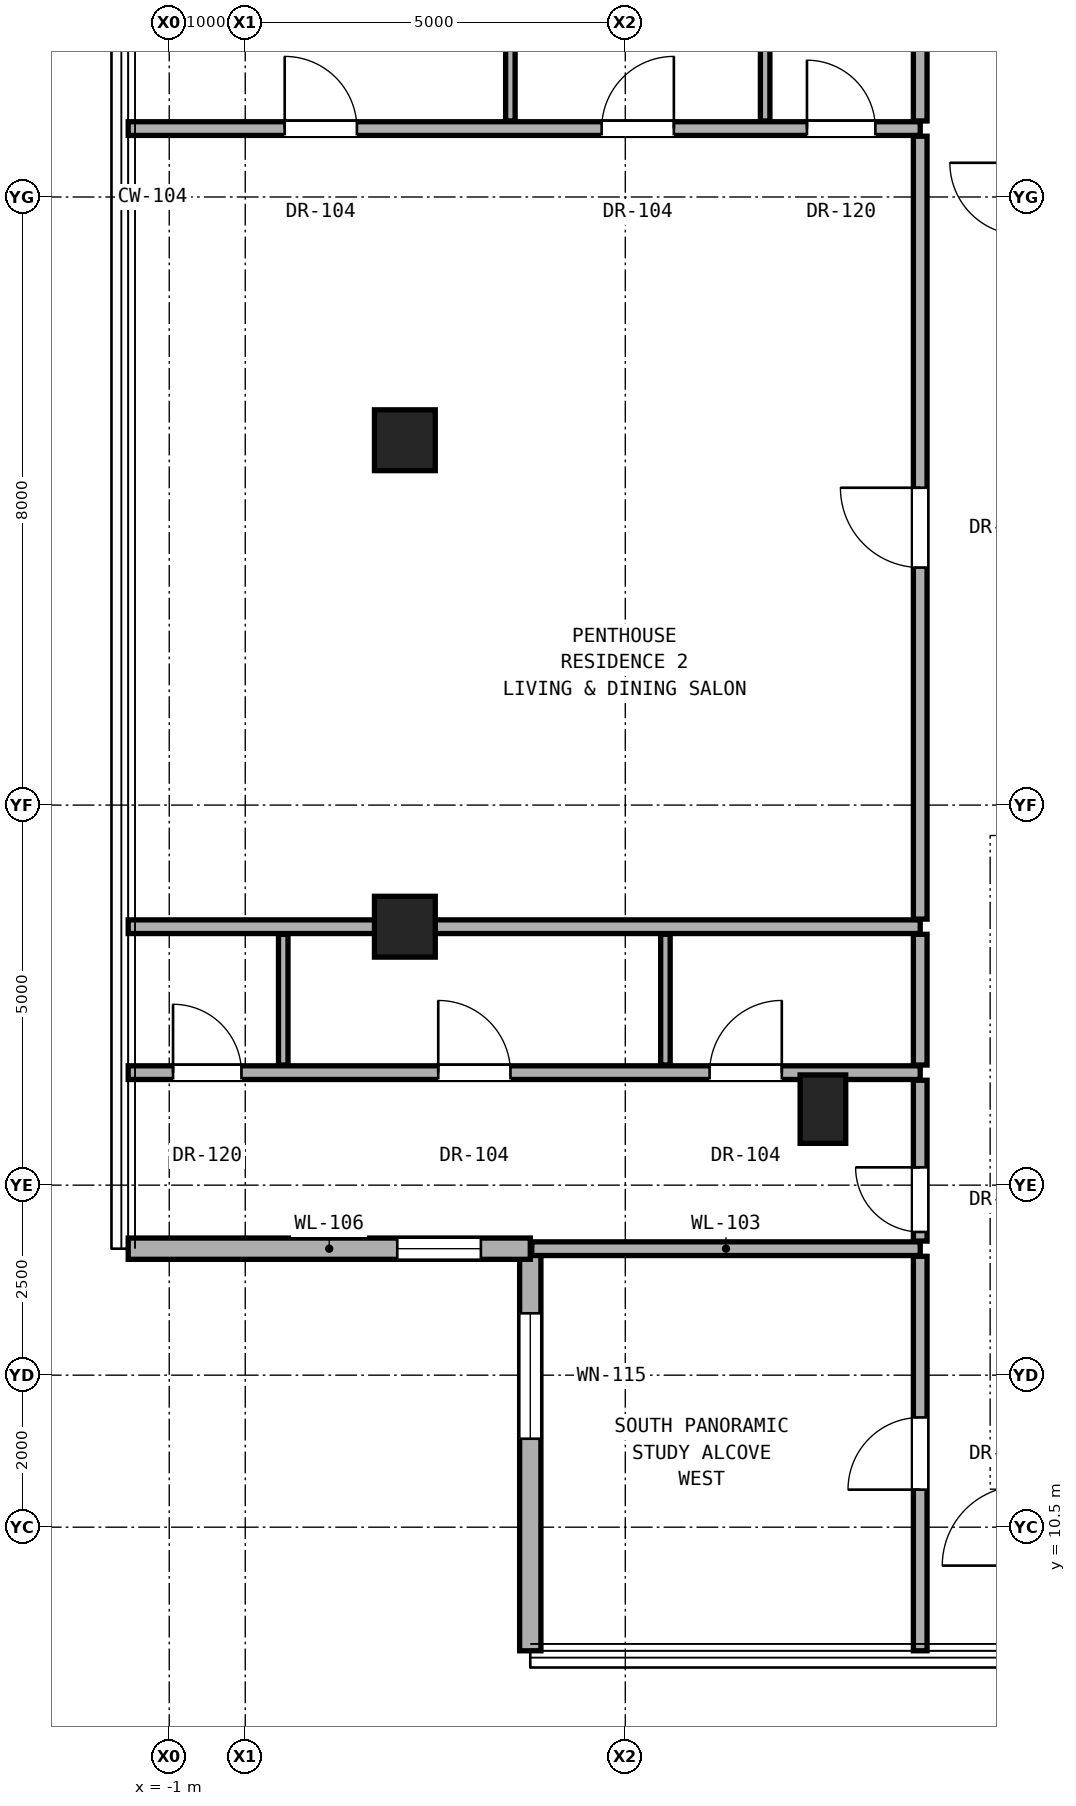
"""IFC4 building model, lengths in metres.
Left out: names, types, materials, properties, quantities, classifications, styles, units other than length and angle.
Written with IfcOpenShell. Run it as: python <this file> out.ifc"""

import sys

from ifc_helpers import new_model, si_unit, direction, frame, frame_2d, origin, origin_2d, place, context, subcontext, project, spatial, rectangle, hollow_rectangle, extrude, element, fill, save


model = new_model("IFC4")
c1 = context("Model", 3, precision=1e-05, world=origin(), true_north=direction((0.0, 1.0)))
c2 = subcontext(c1, "Body", "Model", "MODEL_VIEW")
j1 = project(units=[si_unit("LENGTHUNIT", "METRE"), si_unit("PLANEANGLEUNIT", "RADIAN")], contexts=[c1])
p1 = place(None, origin())
s1 = spatial("IfcSite", under=j1, at=p1, CompositionType="ELEMENT")
p2 = place(p1, origin())
s2 = spatial("IfcBuilding", under=s1, at=p2, CompositionType="ELEMENT")
p3 = place(p2, frame((0.0, 0.0, 242.5)))
s3 = spatial("IfcBuildingStorey", under=s2, at=p3, CompositionType="ELEMENT", Elevation=242.5)
for number, where, z_axis, x_axis in (
    (1, (2.1, 18.4, 0.0), (0.0, 0.0, 1.0), (1.0, 0.0, 0.0)),
    (2, (2.1, 24.8, 0.0), (0.0, 0.0, 1.0), (1.0, 0.0, 0.0)),
):
    element("IfcColumn", number, at=place(p3, frame(where, z_axis=z_axis, x_axis=x_axis)), inside=s3, PredefinedType="COLUMN", context=c2, shape_type="SweptSolid", body=[
        extrude(hollow_rectangle(XDim=0.8, YDim=0.8, WallThickness=0.045, at=origin_2d()), origin(), (0.0, 0.0, 1.0), 3.3),
    ])
p4 = place(p3, frame((7.6, 16.0, 0.0), z_axis=(0.0, 0.0, 1.0), x_axis=(1.0, 0.0, 0.0)))
e3 = element("IfcColumn", 3, at=p4, inside=s3, PredefinedType="PILASTER", context=c2, shape_type="SweptSolid", body=[
    extrude(rectangle(XDim=0.6, YDim=0.9, at=origin_2d()), origin(), (0.0, 0.0, 1.0), 3.3),
])
p5 = place(p3, frame((3.75, 14.164, 0.0), z_axis=(0.0, 0.0, 1.0), x_axis=(0.0, -1.0, 0.0)))
e4 = element("IfcWall", 4, at=p5, inside=s3, PredefinedType="SOLIDWALL", context=c2, shape_type="SweptSolid", body=[
    extrude(rectangle(XDim=5.29, YDim=0.28, at=frame_2d((2.645, 0.0))), origin(), (0.0, 0.0, 1.0), 3.08),
])
p6 = place(p5, frame((0.85, 0.0, 0.73)))
e5 = element("IfcOpeningElement", 5, at=p6, cuts=e4, PredefinedType="OPENING", context=c2, shape_type="SweptSolid", body=[
    extrude(rectangle(XDim=1.65, YDim=2.2, at=frame_2d((0.825, 1.1))), frame((0.0, 0.15, 0.0), z_axis=(0.0, -1.0, 0.0), x_axis=(1.0, 0.0, 0.0)), (0.0, 0.0, 1.0), 0.3),
])
p7 = place(p3, frame((-1.54, 14.164, 0.0), z_axis=(0.0, 0.0, 1.0), x_axis=(1.0, 0.0, 0.0)))
e6 = element("IfcWall", 6, at=p7, inside=s3, PredefinedType="SOLIDWALL", context=c2, shape_type="SweptSolid", body=[
    extrude(rectangle(XDim=5.29, YDim=0.28, at=frame_2d((2.645, 0.0))), origin(), (0.0, 0.0, 1.0), 3.08),
])
p8 = place(p7, frame((3.54, 0.0, 0.85)))
e7 = element("IfcOpeningElement", 7, at=p8, cuts=e6, PredefinedType="OPENING", context=c2, shape_type="SweptSolid", body=[
    extrude(rectangle(XDim=1.1, YDim=2.0, at=frame_2d((0.55, 1.0))), frame((0.0, 0.15, 0.0), z_axis=(0.0, -1.0, 0.0), x_axis=(1.0, 0.0, 0.0)), (0.0, 0.0, 1.0), 0.3),
])
p9 = place(p3, frame((3.77, 14.164, 0.0), z_axis=(0.0, 0.0, 1.0), x_axis=(1.0, 0.0, 0.0)))
e8 = element("IfcWall", 8, at=p9, inside=s3, PredefinedType="PARTITIONING", context=c2, shape_type="SweptSolid", body=[
    extrude(rectangle(XDim=5.11, YDim=0.18, at=frame_2d((2.555, 0.0))), origin(), (0.0, 0.0, 1.0), 3.1),
])
p10 = place(p3, frame((-1.54, 16.48, 0.0), z_axis=(0.0, 0.0, 1.0), x_axis=(1.0, 0.0, 0.0)))
e9 = element("IfcWall", 9, at=p10, inside=s3, PredefinedType="PARTITIONING", context=c2, shape_type="SweptSolid", body=[
    extrude(rectangle(XDim=10.42, YDim=0.18, at=frame_2d((5.21, 0.0))), origin(), (0.0, 0.0, 1.0), 2.543),
])
p11 = place(p10, frame((4.079, 0.0, 0.0)))
e10 = element("IfcOpeningElement", 10, at=p11, cuts=e9, PredefinedType="OPENING", context=c2, shape_type="SweptSolid", body=[
    extrude(rectangle(XDim=0.95, YDim=2.15, at=frame_2d((0.475, 1.075))), frame((0.0, 0.1, 0.0), z_axis=(0.0, -1.0, 0.0), x_axis=(1.0, 0.0, 0.0)), (0.0, 0.0, 1.0), 0.2),
])
p12 = place(p10, frame((7.649, 0.0, 0.0)))
e11 = element("IfcOpeningElement", 11, at=p12, cuts=e9, PredefinedType="OPENING", context=c2, shape_type="SweptSolid", body=[
    extrude(rectangle(XDim=0.95, YDim=2.15, at=frame_2d((0.475, 1.075))), frame((0.0, 0.1, 0.0), z_axis=(0.0, -1.0, 0.0), x_axis=(1.0, 0.0, 0.0)), (0.0, 0.0, 1.0), 0.2),
])
p13 = place(p10, frame((0.59, 0.0, 0.0)))
e12 = element("IfcOpeningElement", 12, at=p13, cuts=e9, PredefinedType="OPENING", context=c2, shape_type="SweptSolid", body=[
    extrude(rectangle(XDim=0.9, YDim=2.1, at=frame_2d((0.45, 1.05))), frame((0.0, 0.1, 0.0), z_axis=(0.0, -1.0, 0.0), x_axis=(1.0, 0.0, 0.0)), (0.0, 0.0, 1.0), 0.2),
])
p14 = place(p3, frame((-1.54, 18.4, 0.0), z_axis=(0.0, 0.0, 1.0), x_axis=(1.0, 0.0, 0.0)))
e13 = element("IfcWall", 13, at=p14, inside=s3, PredefinedType="PARTITIONING", context=c2, shape_type="SweptSolid", body=[
    extrude(rectangle(XDim=10.42, YDim=0.18, at=frame_2d((5.21, 0.0))), origin(), (0.0, 0.0, 1.0), 2.319),
])
p15 = place(p3, frame((-1.54, 28.9, 0.0), z_axis=(0.0, 0.0, 1.0), x_axis=(1.0, 0.0, 0.0)))
e14 = element("IfcWall", 14, at=p15, inside=s3, PredefinedType="PARTITIONING", context=c2, shape_type="SweptSolid", body=[
    extrude(rectangle(XDim=10.42, YDim=0.18, at=frame_2d((5.21, 0.0))), origin(), (0.0, 0.0, 1.0), 2.319),
])
p16 = place(p15, frame((2.059, 0.0, 0.0)))
e15 = element("IfcOpeningElement", 15, at=p16, cuts=e14, PredefinedType="OPENING", context=c2, shape_type="SweptSolid", body=[
    extrude(rectangle(XDim=0.95, YDim=2.15, at=frame_2d((0.475, 1.075))), frame((0.0, 0.1, 0.0), z_axis=(0.0, -1.0, 0.0), x_axis=(1.0, 0.0, 0.0)), (0.0, 0.0, 1.0), 0.2),
])
p17 = place(p15, frame((6.229, 0.0, 0.0)))
e16 = element("IfcOpeningElement", 16, at=p17, cuts=e14, PredefinedType="OPENING", context=c2, shape_type="SweptSolid", body=[
    extrude(rectangle(XDim=0.95, YDim=2.15, at=frame_2d((0.475, 1.075))), frame((0.0, 0.1, 0.0), z_axis=(0.0, -1.0, 0.0), x_axis=(1.0, 0.0, 0.0)), (0.0, 0.0, 1.0), 0.2),
])
p18 = place(p15, frame((8.93, 0.0, 0.0)))
e17 = element("IfcOpeningElement", 17, at=p18, cuts=e14, PredefinedType="OPENING", context=c2, shape_type="SweptSolid", body=[
    extrude(rectangle(XDim=0.9, YDim=2.1, at=frame_2d((0.45, 1.05))), frame((0.0, 0.1, 0.0), z_axis=(0.0, -1.0, 0.0), x_axis=(1.0, 0.0, 0.0)), (0.0, 0.0, 1.0), 0.2),
])
p19 = place(p3, frame((0.5, 16.58, 0.0), z_axis=(0.0, 0.0, 1.0), x_axis=(0.0, 1.0, 0.0)))
e18 = element("IfcWall", 18, at=p19, inside=s3, PredefinedType="PARTITIONING", context=c2, shape_type="SweptSolid", body=[
    extrude(rectangle(XDim=1.72, YDim=0.125, at=frame_2d((0.86, 0.0))), origin(), (0.0, 0.0, 1.0), 3.1),
])
p20 = place(p3, frame((3.488, 29.0, 0.0), z_axis=(0.0, 0.0, 1.0), x_axis=(0.0, 1.0, 0.0)))
e19 = element("IfcWall", 19, at=p20, inside=s3, PredefinedType="PARTITIONING", context=c2, shape_type="SweptSolid", body=[
    extrude(rectangle(XDim=2.1, YDim=0.125, at=frame_2d((1.05, 0.0))), origin(), (0.0, 0.0, 1.0), 2.396),
])
p21 = place(p3, frame((5.528, 16.58, 0.0), z_axis=(0.0, 0.0, 1.0), x_axis=(0.0, 1.0, 0.0)))
e20 = element("IfcWall", 20, at=p21, inside=s3, PredefinedType="PARTITIONING", context=c2, shape_type="SweptSolid", body=[
    extrude(rectangle(XDim=1.72, YDim=0.125, at=frame_2d((0.86, 0.0))), origin(), (0.0, 0.0, 1.0), 2.492),
])
p22 = place(p3, frame((6.84, 29.0, 0.0), z_axis=(0.0, 0.0, 1.0), x_axis=(0.0, 1.0, 0.0)))
e21 = element("IfcWall", 21, at=p22, inside=s3, PredefinedType="PARTITIONING", context=c2, shape_type="SweptSolid", body=[
    extrude(rectangle(XDim=2.1, YDim=0.125, at=frame_2d((1.05, 0.0))), origin(), (0.0, 0.0, 1.0), 2.396),
])
p23 = place(p3, frame((8.88, 8.874, 0.0), z_axis=(0.0, 0.0, 1.0), x_axis=(0.0, 1.0, 0.0)))
e22 = element("IfcWall", 22, at=p23, inside=s3, PredefinedType="PARTITIONING", context=c2, shape_type="SweptSolid", body=[
    extrude(rectangle(XDim=5.19, YDim=0.18, at=frame_2d((2.595, 0.0))), origin(), (0.0, 0.0, 1.0), 3.1),
])
p24 = place(p23, frame((2.12, 0.0, 0.0)))
e23 = element("IfcOpeningElement", 23, at=p24, cuts=e22, PredefinedType="OPENING", context=c2, shape_type="SweptSolid", body=[
    extrude(rectangle(XDim=0.95, YDim=2.15, at=frame_2d((0.475, 1.075))), frame((0.0, 0.1, 0.0), z_axis=(0.0, -1.0, 0.0), x_axis=(1.0, 0.0, 0.0)), (0.0, 0.0, 1.0), 0.2),
])
p25 = place(p3, frame((8.88, 14.264, 0.0), z_axis=(0.0, 0.0, 1.0), x_axis=(0.0, 1.0, 0.0)))
e24 = element("IfcWall", 24, at=p25, inside=s3, PredefinedType="PARTITIONING", context=c2, shape_type="SweptSolid", body=[
    extrude(rectangle(XDim=2.116, YDim=0.18, at=frame_2d((1.058, 0.0))), origin(), (0.0, 0.0, 1.0), 3.1),
])
p26 = place(p25, frame((0.12, 0.0, 0.0)))
e25 = element("IfcOpeningElement", 25, at=p26, cuts=e24, PredefinedType="OPENING", context=c2, shape_type="SweptSolid", body=[
    extrude(rectangle(XDim=0.85, YDim=2.01, at=frame_2d((0.425, 1.005))), frame((0.0, 0.1, 0.0), z_axis=(0.0, -1.0, 0.0), x_axis=(1.0, 0.0, 0.0)), (0.0, 0.0, 1.0), 0.2),
])
p27 = place(p3, frame((8.88, 16.58, 0.0), z_axis=(0.0, 0.0, 1.0), x_axis=(0.0, 1.0, 0.0)))
e26 = element("IfcWall", 26, at=p27, inside=s3, PredefinedType="PARTITIONING", context=c2, shape_type="SweptSolid", body=[
    extrude(rectangle(XDim=1.72, YDim=0.18, at=frame_2d((0.86, 0.0))), origin(), (0.0, 0.0, 1.0), 2.492),
])
p28 = place(p3, frame((8.88, 18.5, 0.0), z_axis=(0.0, 0.0, 1.0), x_axis=(0.0, 1.0, 0.0)))
e27 = element("IfcWall", 27, at=p28, inside=s3, PredefinedType="PARTITIONING", context=c2, shape_type="SweptSolid", body=[
    extrude(rectangle(XDim=10.3, YDim=0.18, at=frame_2d((5.15, 0.0))), origin(), (0.0, 0.0, 1.0), 2.396),
])
p29 = place(p28, frame((4.625, 0.0, 0.0)))
e28 = element("IfcOpeningElement", 28, at=p29, cuts=e27, PredefinedType="OPENING", context=c2, shape_type="SweptSolid", body=[
    extrude(rectangle(XDim=1.05, YDim=2.2, at=frame_2d((0.525, 1.1))), frame((0.0, 0.1, 0.0), z_axis=(0.0, -1.0, 0.0), x_axis=(1.0, 0.0, 0.0)), (0.0, 0.0, 1.0), 0.2),
])
p30 = place(p3, frame((8.88, 29.0, 0.0), z_axis=(0.0, 0.0, 1.0), x_axis=(0.0, 1.0, 0.0)))
e29 = element("IfcWall", 29, at=p30, inside=s3, PredefinedType="PARTITIONING", context=c2, shape_type="SweptSolid", body=[
    extrude(rectangle(XDim=2.1, YDim=0.18, at=frame_2d((1.05, 0.0))), origin(), (0.0, 0.0, 1.0), 2.396),
])
p31 = place(p6, origin())
e30 = element("IfcWindow", 30, at=p31, inside=s3, PartitioningType="SINGLE_PANEL", PredefinedType="WINDOW", context=c2, shape_type="SweptSolid", body=[
    extrude(rectangle(XDim=1.65, YDim=2.2, at=frame_2d((0.825, 1.1))), frame((0.0, 0.03, 0.0), z_axis=(0.0, -1.0, 0.0), x_axis=(1.0, 0.0, 0.0)), (0.0, 0.0, 1.0), 0.06),
])
fill(e5, e30)
p32 = place(p8, origin())
e31 = element("IfcWindow", 31, at=p32, inside=s3, PartitioningType="SINGLE_PANEL", PredefinedType="WINDOW", context=c2, shape_type="SweptSolid", body=[
    extrude(rectangle(XDim=1.1, YDim=2.0, at=frame_2d((0.55, 1.0))), frame((0.0, 0.03, 0.0), z_axis=(0.0, -1.0, 0.0), x_axis=(1.0, 0.0, 0.0)), (0.0, 0.0, 1.0), 0.06),
])
fill(e7, e31)
p33 = place(p26, origin())
e32 = element("IfcDoor", 32, at=p33, inside=s3, OperationType="SINGLE_SWING_RIGHT", PredefinedType="DOOR", context=c2, shape_type="SweptSolid", body=[
    extrude(rectangle(XDim=0.85, YDim=2.01, at=frame_2d((0.425, 1.005))), frame((0.0, 0.025, 0.0), z_axis=(0.0, -1.0, 0.0), x_axis=(1.0, 0.0, 0.0)), (0.0, 0.0, 1.0), 0.05),
])
fill(e25, e32)
p34 = place(p11, origin())
e33 = element("IfcDoor", 33, at=p34, inside=s3, OperationType="SINGLE_SWING_LEFT", PredefinedType="DOOR", context=c2, shape_type="SweptSolid", body=[
    extrude(rectangle(XDim=0.95, YDim=2.15, at=frame_2d((0.475, 1.075))), frame((0.0, 0.025, 0.0), z_axis=(0.0, -1.0, 0.0), x_axis=(1.0, 0.0, 0.0)), (0.0, 0.0, 1.0), 0.05),
])
fill(e10, e33)
p35 = place(p12, origin())
e34 = element("IfcDoor", 34, at=p35, inside=s3, OperationType="SINGLE_SWING_RIGHT", PredefinedType="DOOR", context=c2, shape_type="SweptSolid", body=[
    extrude(rectangle(XDim=0.95, YDim=2.15, at=frame_2d((0.475, 1.075))), frame((0.0, 0.025, 0.0), z_axis=(0.0, -1.0, 0.0), x_axis=(1.0, 0.0, 0.0)), (0.0, 0.0, 1.0), 0.05),
])
fill(e11, e34)
p36 = place(p13, origin())
e35 = element("IfcDoor", 35, at=p36, inside=s3, OperationType="SINGLE_SWING_LEFT", PredefinedType="DOOR", context=c2, shape_type="SweptSolid", body=[
    extrude(rectangle(XDim=0.9, YDim=2.1, at=frame_2d((0.45, 1.05))), frame((0.0, 0.025, 0.0), z_axis=(0.0, -1.0, 0.0), x_axis=(1.0, 0.0, 0.0)), (0.0, 0.0, 1.0), 0.05),
])
fill(e12, e35)
p37 = place(p29, origin())
e36 = element("IfcDoor", 36, at=p37, inside=s3, OperationType="SINGLE_SWING_RIGHT", PredefinedType="DOOR", context=c2, shape_type="SweptSolid", body=[
    extrude(rectangle(XDim=1.05, YDim=2.2, at=frame_2d((0.525, 1.1))), frame((0.0, 0.025, 0.0), z_axis=(0.0, -1.0, 0.0), x_axis=(1.0, 0.0, 0.0)), (0.0, 0.0, 1.0), 0.05),
])
fill(e28, e36)
p38 = place(p16, origin())
e37 = element("IfcDoor", 37, at=p38, inside=s3, OperationType="SINGLE_SWING_LEFT", PredefinedType="DOOR", context=c2, shape_type="SweptSolid", body=[
    extrude(rectangle(XDim=0.95, YDim=2.15, at=frame_2d((0.475, 1.075))), frame((0.0, 0.025, 0.0), z_axis=(0.0, -1.0, 0.0), x_axis=(1.0, 0.0, 0.0)), (0.0, 0.0, 1.0), 0.05),
])
fill(e15, e37)
p39 = place(p17, origin())
e38 = element("IfcDoor", 38, at=p39, inside=s3, OperationType="SINGLE_SWING_RIGHT", PredefinedType="DOOR", context=c2, shape_type="SweptSolid", body=[
    extrude(rectangle(XDim=0.95, YDim=2.15, at=frame_2d((0.475, 1.075))), frame((0.0, 0.025, 0.0), z_axis=(0.0, -1.0, 0.0), x_axis=(1.0, 0.0, 0.0)), (0.0, 0.0, 1.0), 0.05),
])
fill(e16, e38)
p40 = place(p18, origin())
e39 = element("IfcDoor", 39, at=p40, inside=s3, OperationType="SINGLE_SWING_LEFT", PredefinedType="DOOR", context=c2, shape_type="SweptSolid", body=[
    extrude(rectangle(XDim=0.9, YDim=2.1, at=frame_2d((0.45, 1.05))), frame((0.0, 0.025, 0.0), z_axis=(0.0, -1.0, 0.0), x_axis=(1.0, 0.0, 0.0)), (0.0, 0.0, 1.0), 0.05),
])
fill(e17, e39)
p41 = place(p24, origin())
e40 = element("IfcDoor", 40, at=p41, inside=s3, OperationType="SINGLE_SWING_LEFT", PredefinedType="DOOR", context=c2, shape_type="SweptSolid", body=[
    extrude(rectangle(XDim=0.95, YDim=2.15, at=frame_2d((0.475, 1.075))), frame((0.0, 0.025, 0.0), z_axis=(0.0, -1.0, 0.0), x_axis=(1.0, 0.0, 0.0)), (0.0, 0.0, 1.0), 0.05),
])
fill(e23, e40)
save(model, sys.argv[1])
